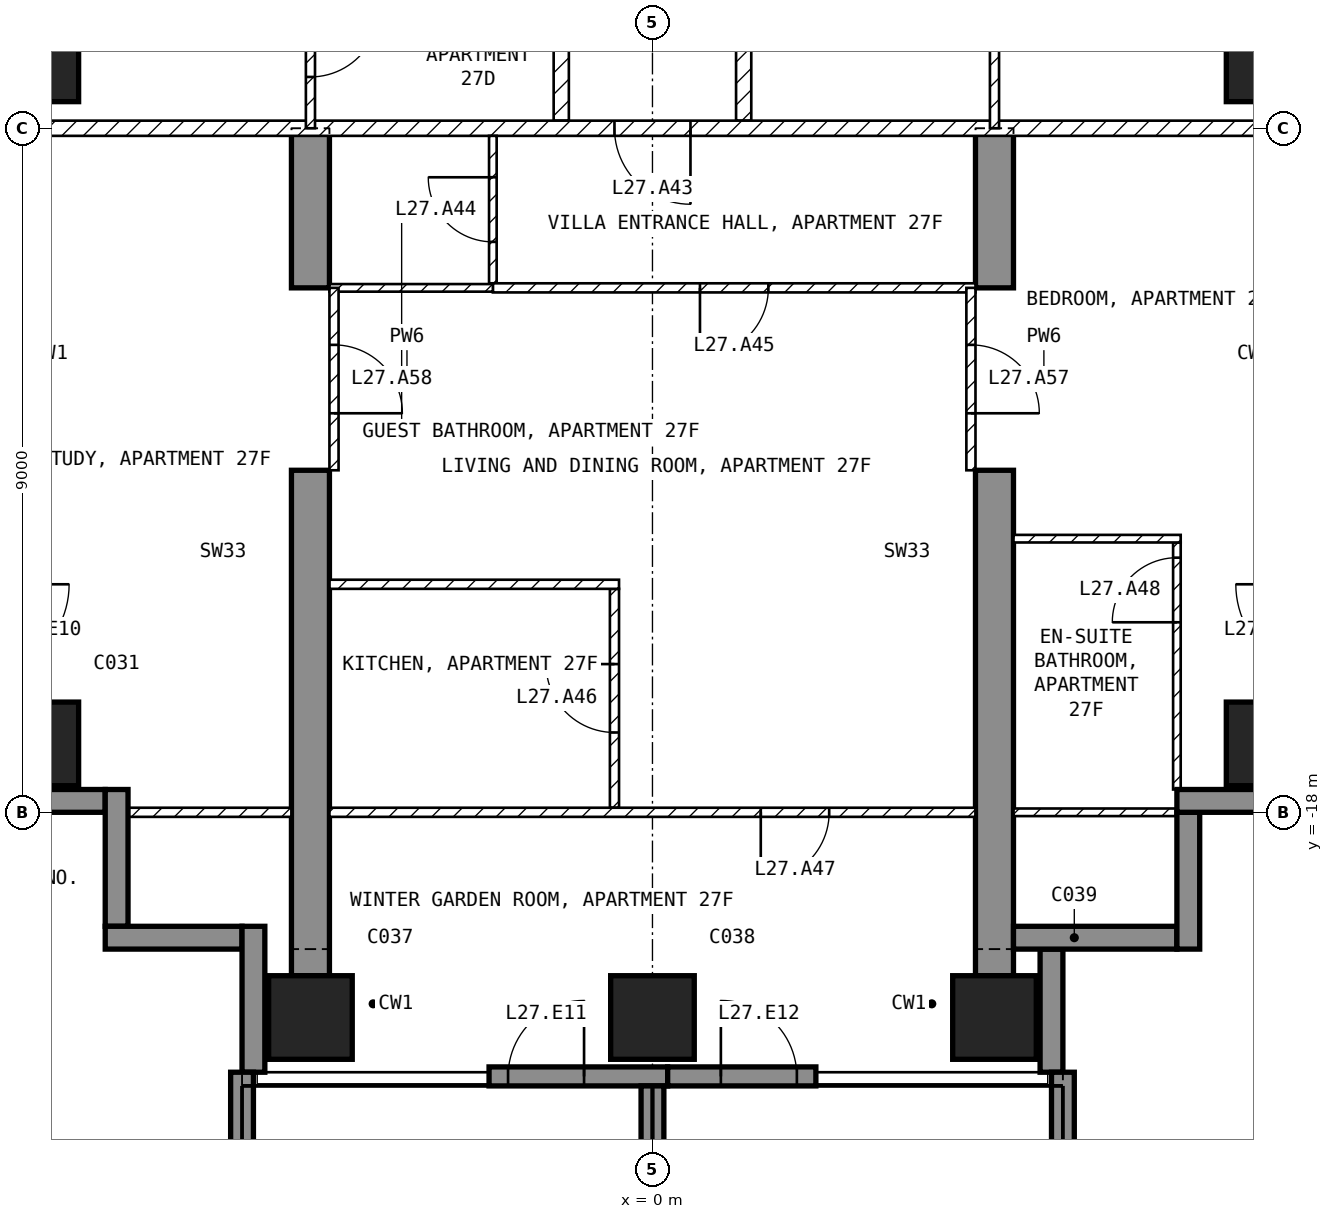
"""IFC4 building model, lengths in metres.
Left out: names, types, materials, properties, quantities, classifications, styles, units other than length and angle.
Written with IfcOpenShell. Run it as: python <this file> out.ifc"""

import sys

from ifc_helpers import new_model, si_unit, direction, frame, frame_2d, origin, origin_2d, place, context, subcontext, project, spatial, polyline, rectangle, outline, extrude, element, fill, save


model = new_model("IFC4")
c1 = context("Model", 3, precision=1e-05, world=origin(), true_north=direction((0.0, 1.0)))
c2 = subcontext(c1, "Body", "Model", "MODEL_VIEW")
j1 = project(units=[si_unit("LENGTHUNIT", "METRE"), si_unit("PLANEANGLEUNIT", "RADIAN")], contexts=[c1])
p1 = place(None, origin())
s1 = spatial("IfcSite", under=j1, at=p1, CompositionType="ELEMENT")
p2 = place(p1, origin())
s2 = spatial("IfcBuilding", under=s1, at=p2, CompositionType="ELEMENT")
p3 = place(p2, frame((0.0, 0.0, 116.4)))
s3 = spatial("IfcBuildingStorey", under=s2, at=p3, CompositionType="ELEMENT", Elevation=116.4)
for number, where, z_axis, x_axis in (
    (1, (-8.1, -17.1, -0.25), (0.0, 0.0, 1.0), (1.0, 0.0, 0.0)),
    (2, (-8.1, -8.1, -0.25), (0.0, 0.0, 1.0), (1.0, 0.0, 0.0)),
    (3, (-4.5, -20.7, -0.25), (0.0, 0.0, 1.0), (1.0, 0.0, 0.0)),
    (4, (0.0, -20.7, -0.25), (0.0, 0.0, 1.0), (1.0, 0.0, 0.0)),
    (5, (4.5, -20.7, -0.25), (0.0, 0.0, 1.0), (1.0, 0.0, 0.0)),
    (6, (8.1, -17.1, -0.25), (0.0, 0.0, 1.0), (1.0, 0.0, 0.0)),
    (7, (8.1, -8.1, -0.25), (0.0, 0.0, 1.0), (1.0, 0.0, 0.0)),
):
    element("IfcColumn", number, at=place(p3, frame(where, z_axis=z_axis, x_axis=x_axis)), inside=s3, PredefinedType="COLUMN", context=c2, shape_type="SweptSolid", body=[
        extrude(rectangle(XDim=1.1, YDim=1.1, at=origin_2d()), origin(), (0.0, 0.0, 1.0), 3.5),
    ])
for number, where, z_axis, x_axis in (
    (8, (-4.75, -20.15, -0.25), (1.0, 0.0, 0.0), (0.0, 1.0, 0.0)),
    (9, (4.25, -20.15, -0.25), (1.0, 0.0, 0.0), (0.0, 1.0, 0.0)),
):
    element("IfcWall", number, at=place(p3, frame(where, z_axis=z_axis, x_axis=x_axis)), inside=s3, PredefinedType="SHEAR", context=c2, shape_type="SweptSolid", body=[
        extrude(outline(polyline([(0.0, 0.0), (6.65, 0.0), (6.65, 2.65), (9.05, 2.65), (9.05, 0.0), (11.15, 0.0), (11.15, 3.5), (0.0, 3.5), (0.0, 0.0)])), origin(), (0.0, 0.0, 1.0), 0.5),
    ])
p4 = place(p3, frame((-2.15, -21.475, 0.0), z_axis=(0.0, 0.0, 1.0), x_axis=(1.0, 0.0, 0.0)))
e10 = element("IfcWall", 10, at=p4, inside=s3, PredefinedType="SOLIDWALL", context=c2, shape_type="SweptSolid", body=[
    extrude(rectangle(XDim=2.35, YDim=0.25, at=frame_2d((1.175, 0.0))), origin(), (0.0, 0.0, 1.0), 3.25),
])
p5 = place(p4, frame((0.25, 0.0, 0.0)))
e11 = element("IfcOpeningElement", 11, at=p5, cuts=e10, PredefinedType="OPENING", context=c2, shape_type="SweptSolid", body=[
    extrude(rectangle(XDim=1.0, YDim=2.4, at=frame_2d((0.5, 1.2))), frame((0.0, 0.135, 0.0), z_axis=(0.0, -1.0, 0.0), x_axis=(1.0, 0.0, 0.0)), (0.0, 0.0, 1.0), 0.27),
])
p6 = place(p3, frame((0.2, -21.475, 0.0), z_axis=(0.0, 0.0, 1.0), x_axis=(1.0, 0.0, 0.0)))
e12 = element("IfcWall", 12, at=p6, inside=s3, PredefinedType="SOLIDWALL", context=c2, shape_type="SweptSolid", body=[
    extrude(rectangle(XDim=1.95, YDim=0.25, at=frame_2d((0.975, 0.0))), origin(), (0.0, 0.0, 1.0), 3.25),
])
p7 = place(p6, frame((0.7, 0.0, 0.0)))
e13 = element("IfcOpeningElement", 13, at=p7, cuts=e12, PredefinedType="OPENING", context=c2, shape_type="SweptSolid", body=[
    extrude(rectangle(XDim=1.0, YDim=2.4, at=frame_2d((0.5, 1.2))), frame((0.0, 0.135, 0.0), z_axis=(0.0, -1.0, 0.0), x_axis=(1.0, 0.0, 0.0)), (0.0, 0.0, 1.0), 0.27),
])
p8 = place(p3, frame((5.25, -21.42, 0.0), z_axis=(0.0, 0.0, 1.0), x_axis=(0.0, 1.0, 0.0)))
e14 = element("IfcWall", 14, at=p8, inside=s3, PredefinedType="SOLIDWALL", context=c2, shape_type="SweptSolid", body=[
    extrude(rectangle(XDim=1.62, YDim=0.3, at=frame_2d((0.81, 0.0))), origin(), (0.0, 0.0, 1.0), 3.25),
])
p9 = place(p3, frame((4.75, -19.65, 0.0), z_axis=(0.0, 0.0, 1.0), x_axis=(1.0, 0.0, 0.0)))
e15 = element("IfcWall", 15, at=p9, inside=s3, PredefinedType="SOLIDWALL", context=c2, shape_type="SweptSolid", body=[
    extrude(rectangle(XDim=2.15, YDim=0.3, at=frame_2d((1.075, 0.0))), origin(), (0.0, 0.0, 1.0), 3.25),
])
p10 = place(p3, frame((7.05, -19.8, 0.0), z_axis=(0.0, 0.0, 1.0), x_axis=(0.0, 1.0, 0.0)))
e16 = element("IfcWall", 16, at=p10, inside=s3, PredefinedType="SOLIDWALL", context=c2, shape_type="SweptSolid", body=[
    extrude(rectangle(XDim=1.8, YDim=0.3, at=frame_2d((0.9, 0.0))), origin(), (0.0, 0.0, 1.0), 3.25),
])
p11 = place(p3, frame((6.9, -17.85, 0.0), z_axis=(0.0, 0.0, 1.0), x_axis=(1.0, 0.0, 0.0)))
e17 = element("IfcWall", 17, at=p11, inside=s3, PredefinedType="SOLIDWALL", context=c2, shape_type="SweptSolid", body=[
    extrude(rectangle(XDim=1.85, YDim=0.3, at=frame_2d((0.925, 0.0))), origin(), (0.0, 0.0, 1.0), 3.25),
])
p12 = place(p3, frame((-8.75, -17.85, 0.0), z_axis=(0.0, 0.0, 1.0), x_axis=(1.0, 0.0, 0.0)))
e18 = element("IfcWall", 18, at=p12, inside=s3, PredefinedType="SOLIDWALL", context=c2, shape_type="SweptSolid", body=[
    extrude(rectangle(XDim=1.55, YDim=0.3, at=frame_2d((0.775, 0.0))), origin(), (0.0, 0.0, 1.0), 3.25),
])
for number, where, z_axis, x_axis in (
    (19, (-7.05, -17.7, 0.0), (0.0, 0.0, 1.0), (0.0, -1.0, 0.0)),
    (20, (-7.2, -19.65, 0.0), (0.0, 0.0, 1.0), (1.0, 0.0, 0.0)),
):
    element("IfcWall", number, at=place(p3, frame(where, z_axis=z_axis, x_axis=x_axis)), inside=s3, PredefinedType="SOLIDWALL", context=c2, shape_type="SweptSolid", body=[
        extrude(rectangle(XDim=1.8, YDim=0.3, at=frame_2d((0.9, 0.0))), origin(), (0.0, 0.0, 1.0), 3.25),
    ])
p13 = place(p3, frame((-5.25, -19.5, 0.0), z_axis=(0.0, 0.0, 1.0), x_axis=(0.0, -1.0, 0.0)))
e21 = element("IfcWall", 21, at=p13, inside=s3, PredefinedType="SOLIDWALL", context=c2, shape_type="SweptSolid", body=[
    extrude(rectangle(XDim=1.92, YDim=0.3, at=frame_2d((0.96, 0.0))), origin(), (0.0, 0.0, 1.0), 3.25),
])
p14 = place(p3, frame((-5.4, -21.42, 0.0), z_axis=(0.0, 0.0, 1.0), x_axis=(0.0, -1.0, 0.0)))
e22 = element("IfcWall", 22, at=p14, inside=s3, PredefinedType="SOLIDWALL", context=c2, shape_type="SweptSolid", body=[
    extrude(rectangle(XDim=2.88, YDim=0.3, at=frame_2d((1.44, 0.0))), origin(), (0.0, 0.0, 1.0), 3.25),
])
p15 = place(p3, frame((0.0, -21.6, 0.0), z_axis=(0.0, 0.0, 1.0), x_axis=(0.0, -1.0, 0.0)))
e23 = element("IfcWall", 23, at=p15, inside=s3, PredefinedType="SOLIDWALL", context=c2, shape_type="SweptSolid", body=[
    extrude(rectangle(XDim=2.7, YDim=0.3, at=frame_2d((1.35, 0.0))), origin(), (0.0, 0.0, 1.0), 3.25),
])
p16 = place(p3, frame((5.4, -21.42, 0.0), z_axis=(0.0, 0.0, 1.0), x_axis=(0.0, -1.0, 0.0)))
e24 = element("IfcWall", 24, at=p16, inside=s3, PredefinedType="SOLIDWALL", context=c2, shape_type="SweptSolid", body=[
    extrude(rectangle(XDim=2.88, YDim=0.3, at=frame_2d((1.44, 0.0))), origin(), (0.0, 0.0, 1.0), 3.25),
])
for number, where, z_axis, x_axis in (
    (25, (1.2, -4.6, 0.0), (0.0, 0.0, 1.0), (0.0, -1.0, 0.0)),
    (26, (-1.2, -8.9, 0.0), (0.0, 0.0, 1.0), (0.0, 1.0, 0.0)),
):
    element("IfcWall", number, at=place(p3, frame(where, z_axis=z_axis, x_axis=x_axis)), inside=s3, PredefinedType="PARTITIONING", context=c2, shape_type="SweptSolid", body=[
        extrude(rectangle(XDim=4.3, YDim=0.2, at=frame_2d((2.15, 0.0))), origin(), (0.0, 0.0, 1.0), 3.25),
    ])
p17 = place(p3, frame((8.92, -9.0, 0.0), z_axis=(0.0, 0.0, 1.0), x_axis=(-1.0, 0.0, 0.0)))
e27 = element("IfcWall", 27, at=p17, inside=s3, PredefinedType="PARTITIONING", context=c2, shape_type="SweptSolid", body=[
    extrude(rectangle(XDim=17.84, YDim=0.2, at=frame_2d((8.92, 0.0))), origin(), (0.0, 0.0, 1.0), 3.25),
])
p18 = place(p17, frame((8.42, 0.0, 0.0)))
e28 = element("IfcOpeningElement", 28, at=p18, cuts=e27, PredefinedType="OPENING", context=c2, shape_type="SweptSolid", body=[
    extrude(rectangle(XDim=1.0, YDim=2.1, at=frame_2d((0.5, 1.05))), frame((0.0, 0.11, 0.0), z_axis=(0.0, -1.0, 0.0), x_axis=(1.0, 0.0, 0.0)), (0.0, 0.0, 1.0), 0.22),
])
p19 = place(p3, frame((4.5, -9.0, 0.0), z_axis=(0.0, 0.0, 1.0), x_axis=(0.0, 1.0, 0.0)))
e29 = element("IfcWall", 29, at=p19, inside=s3, PredefinedType="PARTITIONING", context=c2, shape_type="SweptSolid", body=[
    extrude(rectangle(XDim=4.5, YDim=0.12, at=frame_2d((2.25, 0.0))), origin(), (0.0, 0.0, 1.0), 3.25),
])
p20 = place(p19, frame((3.36, 0.0, 0.0)))
e30 = element("IfcOpeningElement", 30, at=p20, cuts=e29, PredefinedType="OPENING", context=c2, shape_type="SweptSolid", body=[
    extrude(rectangle(XDim=0.9, YDim=2.1, at=frame_2d((0.45, 1.05))), frame((0.0, 0.07, 0.0), z_axis=(0.0, -1.0, 0.0), x_axis=(1.0, 0.0, 0.0)), (0.0, 0.0, 1.0), 0.14),
])
p21 = place(p3, frame((-4.5, -6.75, 0.0), z_axis=(0.0, 0.0, 1.0), x_axis=(0.0, -1.0, 0.0)))
e31 = element("IfcWall", 31, at=p21, inside=s3, PredefinedType="PARTITIONING", context=c2, shape_type="SweptSolid", body=[
    extrude(rectangle(XDim=2.25, YDim=0.12, at=frame_2d((1.125, 0.0))), origin(), (0.0, 0.0, 1.0), 3.25),
])
p22 = place(p21, frame((0.675, 0.0, 0.0)))
e32 = element("IfcOpeningElement", 32, at=p22, cuts=e31, PredefinedType="OPENING", context=c2, shape_type="SweptSolid", body=[
    extrude(rectangle(XDim=0.9, YDim=2.1, at=frame_2d((0.45, 1.05))), frame((0.0, 0.07, 0.0), z_axis=(0.0, -1.0, 0.0), x_axis=(1.0, 0.0, 0.0)), (0.0, 0.0, 1.0), 0.14),
])
p23 = place(p3, frame((-2.1, -11.04, 0.0), z_axis=(0.0, 0.0, 1.0), x_axis=(0.0, 1.0, 0.0)))
e33 = element("IfcWall", 33, at=p23, inside=s3, PredefinedType="PARTITIONING", context=c2, shape_type="SweptSolid", body=[
    extrude(rectangle(XDim=1.94, YDim=0.1, at=frame_2d((0.97, 0.0))), origin(), (0.0, 0.0, 1.0), 3.25),
])
p24 = place(p23, frame((0.545, 0.0, 0.0)))
e34 = element("IfcOpeningElement", 34, at=p24, cuts=e33, PredefinedType="OPENING", context=c2, shape_type="SweptSolid", body=[
    extrude(rectangle(XDim=0.85, YDim=2.1, at=frame_2d((0.425, 1.05))), frame((0.0, 0.06, 0.0), z_axis=(0.0, -1.0, 0.0), x_axis=(1.0, 0.0, 0.0)), (0.0, 0.0, 1.0), 0.12),
])
p25 = place(p3, frame((4.25, -11.1, 0.0), z_axis=(0.0, 0.0, 1.0), x_axis=(-1.0, 0.0, 0.0)))
e35 = element("IfcWall", 35, at=p25, inside=s3, PredefinedType="PARTITIONING", context=c2, shape_type="SweptSolid", body=[
    extrude(rectangle(XDim=6.35, YDim=0.12, at=frame_2d((3.175, 0.0))), origin(), (0.0, 0.0, 1.0), 3.25),
])
p26 = place(p25, frame((2.725, 0.0, 0.0)))
e36 = element("IfcOpeningElement", 36, at=p26, cuts=e35, PredefinedType="OPENING", context=c2, shape_type="SweptSolid", body=[
    extrude(rectangle(XDim=0.9, YDim=2.1, at=frame_2d((0.45, 1.05))), frame((0.0, 0.07, 0.0), z_axis=(0.0, -1.0, 0.0), x_axis=(1.0, 0.0, 0.0)), (0.0, 0.0, 1.0), 0.14),
])
p27 = place(p3, frame((-2.1, -11.1, 0.0), z_axis=(0.0, 0.0, 1.0), x_axis=(-1.0, 0.0, 0.0)))
e37 = element("IfcWall", 37, at=p27, inside=s3, PredefinedType="PARTITIONING", context=c2, shape_type="SweptSolid", body=[
    extrude(rectangle(XDim=2.15, YDim=0.1, at=frame_2d((1.075, 0.0))), origin(), (0.0, 0.0, 1.0), 3.25),
])
p28 = place(p3, frame((-0.5, -17.94, 0.0), z_axis=(0.0, 0.0, 1.0), x_axis=(0.0, 1.0, 0.0)))
e38 = element("IfcWall", 38, at=p28, inside=s3, PredefinedType="PARTITIONING", context=c2, shape_type="SweptSolid", body=[
    extrude(rectangle(XDim=2.88, YDim=0.12, at=frame_2d((1.44, 0.0))), origin(), (0.0, 0.0, 1.0), 3.25),
])
p29 = place(p28, frame((0.99, 0.0, 0.0)))
e39 = element("IfcOpeningElement", 39, at=p29, cuts=e38, PredefinedType="OPENING", context=c2, shape_type="SweptSolid", body=[
    extrude(rectangle(XDim=0.9, YDim=2.1, at=frame_2d((0.45, 1.05))), frame((0.0, 0.07, 0.0), z_axis=(0.0, -1.0, 0.0), x_axis=(1.0, 0.0, 0.0)), (0.0, 0.0, 1.0), 0.14),
])
p30 = place(p3, frame((-0.44, -15.0, 0.0), z_axis=(0.0, 0.0, 1.0), x_axis=(-1.0, 0.0, 0.0)))
e40 = element("IfcWall", 40, at=p30, inside=s3, PredefinedType="PARTITIONING", context=c2, shape_type="SweptSolid", body=[
    extrude(rectangle(XDim=3.81, YDim=0.12, at=frame_2d((1.905, 0.0))), origin(), (0.0, 0.0, 1.0), 3.25),
])
p31 = place(p3, frame((4.25, -18.0, 0.0), z_axis=(0.0, 0.0, 1.0), x_axis=(-1.0, 0.0, 0.0)))
e41 = element("IfcWall", 41, at=p31, inside=s3, PredefinedType="PARTITIONING", context=c2, shape_type="SweptSolid", body=[
    extrude(rectangle(XDim=8.5, YDim=0.12, at=frame_2d((4.25, 0.0))), origin(), (0.0, 0.0, 1.0), 3.25),
])
p32 = place(p31, frame((1.925, 0.0, 0.0)))
e42 = element("IfcOpeningElement", 42, at=p32, cuts=e41, PredefinedType="OPENING", context=c2, shape_type="SweptSolid", body=[
    extrude(rectangle(XDim=0.9, YDim=2.1, at=frame_2d((0.45, 1.05))), frame((0.0, 0.07, 0.0), z_axis=(0.0, -1.0, 0.0), x_axis=(1.0, 0.0, 0.0)), (0.0, 0.0, 1.0), 0.14),
])
p33 = place(p3, frame((6.9, -17.7, 0.0), z_axis=(0.0, 0.0, 1.0), x_axis=(0.0, 1.0, 0.0)))
e43 = element("IfcWall", 43, at=p33, inside=s3, PredefinedType="PARTITIONING", context=c2, shape_type="SweptSolid", body=[
    extrude(rectangle(XDim=3.25, YDim=0.1, at=frame_2d((1.625, 0.0))), origin(), (0.0, 0.0, 1.0), 3.25),
])
p34 = place(p33, frame((2.2, 0.0, 0.0)))
e44 = element("IfcOpeningElement", 44, at=p34, cuts=e43, PredefinedType="OPENING", context=c2, shape_type="SweptSolid", body=[
    extrude(rectangle(XDim=0.85, YDim=2.1, at=frame_2d((0.425, 1.05))), frame((0.0, 0.06, 0.0), z_axis=(0.0, -1.0, 0.0), x_axis=(1.0, 0.0, 0.0)), (0.0, 0.0, 1.0), 0.12),
])
p35 = place(p3, frame((6.95, -14.4, 0.0), z_axis=(0.0, 0.0, 1.0), x_axis=(-1.0, 0.0, 0.0)))
e45 = element("IfcWall", 45, at=p35, inside=s3, PredefinedType="PARTITIONING", context=c2, shape_type="SweptSolid", body=[
    extrude(rectangle(XDim=2.2, YDim=0.1, at=frame_2d((1.1, 0.0))), origin(), (0.0, 0.0, 1.0), 3.25),
])
p36 = place(p3, frame((7.12, -18.0, 0.0), z_axis=(0.0, 0.0, 1.0), x_axis=(-1.0, 0.0, 0.0)))
e46 = element("IfcWall", 46, at=p36, inside=s3, PredefinedType="PARTITIONING", context=c2, shape_type="SweptSolid", body=[
    extrude(rectangle(XDim=2.37, YDim=0.1, at=frame_2d((1.185, 0.0))), origin(), (0.0, 0.0, 1.0), 3.25),
])
p37 = place(p3, frame((-4.75, -18.0, 0.0), z_axis=(0.0, 0.0, 1.0), x_axis=(-1.0, 0.0, 0.0)))
e47 = element("IfcWall", 47, at=p37, inside=s3, PredefinedType="PARTITIONING", context=c2, shape_type="SweptSolid", body=[
    extrude(rectangle(XDim=2.37, YDim=0.12, at=frame_2d((1.185, 0.0))), origin(), (0.0, 0.0, 1.0), 3.25),
])
p38 = place(p3, frame((4.19, -11.1, 0.0), z_axis=(0.0, 0.0, 1.0), x_axis=(0.0, -1.0, 0.0)))
e48 = element("IfcWall", 48, at=p38, inside=s3, PredefinedType="PARTITIONING", context=c2, shape_type="SweptSolid", body=[
    extrude(rectangle(XDim=2.4, YDim=0.12, at=frame_2d((1.2, 0.0))), origin(), (0.0, 0.0, 1.0), 2.4),
])
p39 = place(p38, frame((0.75, 0.0, 0.0)))
e49 = element("IfcOpeningElement", 49, at=p39, cuts=e48, PredefinedType="OPENING", context=c2, shape_type="SweptSolid", body=[
    extrude(rectangle(XDim=0.9, YDim=2.1, at=frame_2d((0.45, 1.05))), frame((0.0, 0.07, 0.0), z_axis=(0.0, -1.0, 0.0), x_axis=(1.0, 0.0, 0.0)), (0.0, 0.0, 1.0), 0.14),
])
p40 = place(p3, frame((-4.19, -11.1, 0.0), z_axis=(0.0, 0.0, 1.0), x_axis=(0.0, -1.0, 0.0)))
e50 = element("IfcWall", 50, at=p40, inside=s3, PredefinedType="PARTITIONING", context=c2, shape_type="SweptSolid", body=[
    extrude(rectangle(XDim=2.4, YDim=0.12, at=frame_2d((1.2, 0.0))), origin(), (0.0, 0.0, 1.0), 2.4),
])
p41 = place(p40, frame((0.75, 0.0, 0.0)))
e51 = element("IfcOpeningElement", 51, at=p41, cuts=e50, PredefinedType="OPENING", context=c2, shape_type="SweptSolid", body=[
    extrude(rectangle(XDim=0.9, YDim=2.1, at=frame_2d((0.45, 1.05))), frame((0.0, 0.07, 0.0), z_axis=(0.0, -1.0, 0.0), x_axis=(1.0, 0.0, 0.0)), (0.0, 0.0, 1.0), 0.14),
])
p42 = place(p5, origin())
e52 = element("IfcDoor", 52, at=p42, inside=s3, OperationType="SINGLE_SWING_RIGHT", PredefinedType="DOOR", context=c2, shape_type="SweptSolid", body=[
    extrude(rectangle(XDim=1.0, YDim=2.4, at=frame_2d((0.5, 1.2))), frame((0.0, 0.025, 0.0), z_axis=(0.0, -1.0, 0.0), x_axis=(1.0, 0.0, 0.0)), (0.0, 0.0, 1.0), 0.05),
])
fill(e11, e52)
p43 = place(p7, origin())
e53 = element("IfcDoor", 53, at=p43, inside=s3, OperationType="SINGLE_SWING_LEFT", PredefinedType="DOOR", context=c2, shape_type="SweptSolid", body=[
    extrude(rectangle(XDim=1.0, YDim=2.4, at=frame_2d((0.5, 1.2))), frame((0.0, 0.025, 0.0), z_axis=(0.0, -1.0, 0.0), x_axis=(1.0, 0.0, 0.0)), (0.0, 0.0, 1.0), 0.05),
])
fill(e13, e53)
p44 = place(p22, origin())
e54 = element("IfcDoor", 54, at=p44, inside=s3, OperationType="SINGLE_SWING_LEFT", PredefinedType="DOOR", context=c2, shape_type="SweptSolid", body=[
    extrude(rectangle(XDim=0.9, YDim=2.1, at=frame_2d((0.45, 1.05))), frame((0.0, 0.025, 0.0), z_axis=(0.0, -1.0, 0.0), x_axis=(1.0, 0.0, 0.0)), (0.0, 0.0, 1.0), 0.05),
])
fill(e32, e54)
p45 = place(p18, origin())
e55 = element("IfcDoor", 55, at=p45, inside=s3, OperationType="SINGLE_SWING_LEFT", PredefinedType="DOOR", context=c2, shape_type="SweptSolid", body=[
    extrude(rectangle(XDim=1.0, YDim=2.1, at=frame_2d((0.5, 1.05))), frame((0.0, 0.025, 0.0), z_axis=(0.0, -1.0, 0.0), x_axis=(1.0, 0.0, 0.0)), (0.0, 0.0, 1.0), 0.05),
])
fill(e28, e55)
p46 = place(p24, origin())
e56 = element("IfcDoor", 56, at=p46, inside=s3, OperationType="SINGLE_SWING_RIGHT", PredefinedType="DOOR", context=c2, shape_type="SweptSolid", body=[
    extrude(rectangle(XDim=0.85, YDim=2.1, at=frame_2d((0.425, 1.05))), frame((0.0, 0.025, 0.0), z_axis=(0.0, -1.0, 0.0), x_axis=(1.0, 0.0, 0.0)), (0.0, 0.0, 1.0), 0.05),
])
fill(e34, e56)
p47 = place(p26, origin())
e57 = element("IfcDoor", 57, at=p47, inside=s3, OperationType="SINGLE_SWING_RIGHT", PredefinedType="DOOR", context=c2, shape_type="SweptSolid", body=[
    extrude(rectangle(XDim=0.9, YDim=2.1, at=frame_2d((0.45, 1.05))), frame((0.0, 0.025, 0.0), z_axis=(0.0, -1.0, 0.0), x_axis=(1.0, 0.0, 0.0)), (0.0, 0.0, 1.0), 0.05),
])
fill(e36, e57)
p48 = place(p29, origin())
e58 = element("IfcDoor", 58, at=p48, inside=s3, OperationType="SINGLE_SWING_RIGHT", PredefinedType="DOOR", context=c2, shape_type="SweptSolid", body=[
    extrude(rectangle(XDim=0.9, YDim=2.1, at=frame_2d((0.45, 1.05))), frame((0.0, 0.025, 0.0), z_axis=(0.0, -1.0, 0.0), x_axis=(1.0, 0.0, 0.0)), (0.0, 0.0, 1.0), 0.05),
])
fill(e39, e58)
p49 = place(p32, origin())
e59 = element("IfcDoor", 59, at=p49, inside=s3, OperationType="SINGLE_SWING_RIGHT", PredefinedType="DOOR", context=c2, shape_type="SweptSolid", body=[
    extrude(rectangle(XDim=0.9, YDim=2.1, at=frame_2d((0.45, 1.05))), frame((0.0, 0.025, 0.0), z_axis=(0.0, -1.0, 0.0), x_axis=(1.0, 0.0, 0.0)), (0.0, 0.0, 1.0), 0.05),
])
fill(e42, e59)
p50 = place(p34, origin())
e60 = element("IfcDoor", 60, at=p50, inside=s3, OperationType="SINGLE_SWING_LEFT", PredefinedType="DOOR", context=c2, shape_type="SweptSolid", body=[
    extrude(rectangle(XDim=0.85, YDim=2.1, at=frame_2d((0.425, 1.05))), frame((0.0, 0.025, 0.0), z_axis=(0.0, -1.0, 0.0), x_axis=(1.0, 0.0, 0.0)), (0.0, 0.0, 1.0), 0.05),
])
fill(e44, e60)
p51 = place(p39, origin())
e61 = element("IfcDoor", 61, at=p51, inside=s3, OperationType="SINGLE_SWING_RIGHT", PredefinedType="DOOR", context=c2, shape_type="SweptSolid", body=[
    extrude(rectangle(XDim=0.9, YDim=2.1, at=frame_2d((0.45, 1.05))), frame((0.0, 0.025, 0.0), z_axis=(0.0, -1.0, 0.0), x_axis=(1.0, 0.0, 0.0)), (0.0, 0.0, 1.0), 0.05),
])
fill(e49, e61)
p52 = place(p41, origin())
e62 = element("IfcDoor", 62, at=p52, inside=s3, OperationType="SINGLE_SWING_RIGHT", PredefinedType="DOOR", context=c2, shape_type="SweptSolid", body=[
    extrude(rectangle(XDim=0.9, YDim=2.1, at=frame_2d((0.45, 1.05))), frame((0.0, 0.025, 0.0), z_axis=(0.0, -1.0, 0.0), x_axis=(1.0, 0.0, 0.0)), (0.0, 0.0, 1.0), 0.05),
])
fill(e51, e62)
save(model, sys.argv[1])
